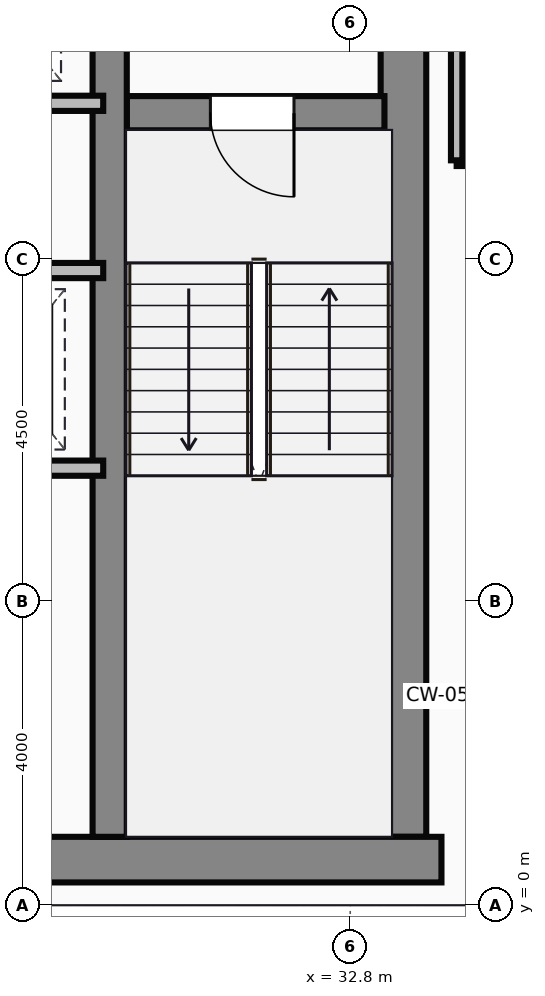
"""IFC4 building model, lengths in metres.
Left out: names, types, materials, properties, quantities, classifications, styles, units other than length and angle.
Written with IfcOpenShell. Run it as: python <this file> out.ifc"""

import sys

from ifc_helpers import new_model, si_unit, direction, frame, frame_2d, origin, place, context, subcontext, project, spatial, rectangle, extrude, source, transform, mapped, element, fill, save


model = new_model("IFC4")
c1 = context("Model", 3, precision=1e-05, world=origin(), true_north=direction((0.0, 1.0)))
c2 = subcontext(c1, "Body", "Model", "MODEL_VIEW")
j1 = project(units=[si_unit("LENGTHUNIT", "METRE"), si_unit("PLANEANGLEUNIT", "RADIAN")], contexts=[c1])
p1 = place(None, origin())
s1 = spatial("IfcSite", under=j1, at=p1, CompositionType="ELEMENT")
p2 = place(p1, origin())
s2 = spatial("IfcBuilding", under=s1, at=p2, CompositionType="ELEMENT")
p3 = place(p2, frame((0.0, 0.0, 269.75)))
s3 = spatial("IfcBuildingStorey", under=s2, at=p3, CompositionType="ELEMENT", Elevation=269.75)
m1 = source(origin(), c2, "Body", "SweptSolid", [
    extrude(rectangle(XDim=29.5, YDim=0.6, at=frame_2d((14.75, 0.0))), origin(), (0.0, 0.0, 1.0), 3.65),
])
p4 = place(p3, frame((4.5, 0.6, 0.0), z_axis=(0.0, 0.0, 1.0), x_axis=(1.0, 0.0, 0.0)))
e1 = element("IfcWall", 1, at=p4, inside=s3, PredefinedType="SHEAR", context=c2, shape_type="MappedRepresentation", body=[
    mapped(m1, transform((0.0, 0.0, 0.0))),
])
m2 = source(origin(), c2, "Body", "SweptSolid", [
    extrude(rectangle(XDim=13.1, YDim=0.6, at=frame_2d((6.55, 0.0))), origin(), (0.0, 0.0, 1.0), 3.65),
])
p5 = place(p3, frame((33.5, 0.9, 0.0), z_axis=(0.0, 0.0, 1.0), x_axis=(0.0, 1.0, 0.0)))
e2 = element("IfcWall", 2, at=p5, inside=s3, PredefinedType="SHEAR", context=c2, shape_type="MappedRepresentation", body=[
    mapped(m2, transform((0.0, 0.0, 0.0))),
])
m3 = source(origin(), c2, "Body", "SweptSolid", [
    extrude(rectangle(XDim=12.5, YDim=0.45, at=frame_2d((6.25, 0.0))), origin(), (0.0, 0.0, 1.0), 3.65),
])
p6 = place(p3, frame((29.635, 0.9, 0.0), z_axis=(0.0, 0.0, 1.0), x_axis=(0.0, 1.0, 0.0)))
e3 = element("IfcWall", 3, at=p6, inside=s3, PredefinedType="SHEAR", context=c2, shape_type="MappedRepresentation", body=[
    mapped(m3, transform((0.0, 0.0, 0.0))),
])
m4 = source(origin(), c2, "Body", "SweptSolid", [
    extrude(rectangle(XDim=3.39, YDim=0.45, at=frame_2d((1.695, 0.0))), origin(), (0.0, 0.0, 1.0), 3.65),
])
p7 = place(p3, frame((29.86, 10.42, 0.0), z_axis=(0.0, 0.0, 1.0), x_axis=(1.0, 0.0, 0.0)))
e4 = element("IfcWall", 4, at=p7, inside=s3, PredefinedType="SHEAR", context=c2, shape_type="MappedRepresentation", body=[
    mapped(m4, transform((0.0, 0.0, 0.0))),
])
p8 = place(p7, frame((1.1, 0.0, 0.0)))
e5 = element("IfcOpeningElement", 5, at=p8, cuts=e4, PredefinedType="OPENING", context=c2, shape_type="SweptSolid", body=[
    extrude(rectangle(XDim=1.1, YDim=2.15, at=frame_2d((0.55, 1.075))), frame((0.0, 0.235, 0.0), z_axis=(0.0, -1.0, 0.0), x_axis=(1.0, 0.0, 0.0)), (0.0, 0.0, 1.0), 0.47),
])
m5 = source(origin(), c2, "Body", "SweptSolid", [
    extrude(rectangle(XDim=8.8, YDim=0.2, at=frame_2d((4.4, 0.0))), origin(), (0.0, 0.0, 1.0), 3.4),
])
p9 = place(p3, frame((20.75, 10.55, 0.0), z_axis=(0.0, 0.0, 1.0), x_axis=(1.0, 0.0, 0.0)))
e6 = element("IfcWall", 6, at=p9, inside=s3, PredefinedType="PARTITIONING", context=c2, shape_type="MappedRepresentation", body=[
    mapped(m5, transform((0.0, 0.0, 0.0))),
])
p10 = place(p9, frame((0.5, 0.0, 0.0)))
e7 = element("IfcOpeningElement", 7, at=p10, cuts=e6, PredefinedType="OPENING", context=c2, shape_type="SweptSolid", body=[
    extrude(rectangle(XDim=1.05, YDim=2.15, at=frame_2d((0.525, 1.075))), frame((0.0, 0.11, 0.0), z_axis=(0.0, -1.0, 0.0), x_axis=(1.0, 0.0, 0.0)), (0.0, 0.0, 1.0), 0.22),
])
p11 = place(p9, frame((2.6, 0.0, 0.0)))
e8 = element("IfcOpeningElement", 8, at=p11, cuts=e6, PredefinedType="OPENING", context=c2, shape_type="SweptSolid", body=[
    extrude(rectangle(XDim=1.05, YDim=2.15, at=frame_2d((0.525, 1.075))), frame((0.0, 0.11, 0.0), z_axis=(0.0, -1.0, 0.0), x_axis=(1.0, 0.0, 0.0)), (0.0, 0.0, 1.0), 0.22),
])
p12 = place(p9, frame((4.7, 0.0, 0.0)))
e9 = element("IfcOpeningElement", 9, at=p12, cuts=e6, PredefinedType="OPENING", context=c2, shape_type="SweptSolid", body=[
    extrude(rectangle(XDim=1.05, YDim=2.15, at=frame_2d((0.525, 1.075))), frame((0.0, 0.11, 0.0), z_axis=(0.0, -1.0, 0.0), x_axis=(1.0, 0.0, 0.0)), (0.0, 0.0, 1.0), 0.22),
])
p13 = place(p9, frame((6.8, 0.0, 0.0)))
e10 = element("IfcOpeningElement", 10, at=p13, cuts=e6, PredefinedType="OPENING", context=c2, shape_type="SweptSolid", body=[
    extrude(rectangle(XDim=1.05, YDim=2.15, at=frame_2d((0.525, 1.075))), frame((0.0, 0.11, 0.0), z_axis=(0.0, -1.0, 0.0), x_axis=(1.0, 0.0, 0.0)), (0.0, 0.0, 1.0), 0.22),
])
m6 = source(origin(), c2, "Body", "SweptSolid", [
    extrude(rectangle(XDim=4.55, YDim=0.2, at=frame_2d((2.275, 0.0))), origin(), (0.0, 0.0, 1.0), 3.4),
])
p14 = place(p3, frame((25.0, 8.35, 0.0), z_axis=(0.0, 0.0, 1.0), x_axis=(1.0, 0.0, 0.0)))
e11 = element("IfcWall", 11, at=p14, inside=s3, PredefinedType="PARTITIONING", context=c2, shape_type="MappedRepresentation", body=[
    mapped(m6, transform((0.0, 0.0, 0.0))),
])
p15 = place(p14, frame((0.5, 0.0, 0.0)))
e12 = element("IfcOpeningElement", 12, at=p15, cuts=e11, PredefinedType="OPENING", context=c2, shape_type="SweptSolid", body=[
    extrude(rectangle(XDim=1.05, YDim=2.15, at=frame_2d((0.525, 1.075))), frame((0.0, 0.11, 0.0), z_axis=(0.0, -1.0, 0.0), x_axis=(1.0, 0.0, 0.0)), (0.0, 0.0, 1.0), 0.22),
])
p16 = place(p14, frame((2.6, 0.0, 0.0)))
e13 = element("IfcOpeningElement", 13, at=p16, cuts=e11, PredefinedType="OPENING", context=c2, shape_type="SweptSolid", body=[
    extrude(rectangle(XDim=1.05, YDim=2.15, at=frame_2d((0.525, 1.075))), frame((0.0, 0.11, 0.0), z_axis=(0.0, -1.0, 0.0), x_axis=(1.0, 0.0, 0.0)), (0.0, 0.0, 1.0), 0.22),
])
p17 = place(p3, frame((25.0, 5.75, 0.0), z_axis=(0.0, 0.0, 1.0), x_axis=(1.0, 0.0, 0.0)))
e14 = element("IfcWall", 14, at=p17, inside=s3, PredefinedType="PARTITIONING", context=c2, shape_type="MappedRepresentation", body=[
    mapped(m6, transform((0.0, 0.0, 0.0))),
])
m7 = source(origin(), c2, "Body", "SweptSolid", [
    extrude(rectangle(XDim=4.8, YDim=0.15, at=frame_2d((2.4, 0.0))), origin(), (0.0, 0.0, 1.0), 3.4),
])
p18 = place(p3, frame((34.2, 9.8, 0.0), z_axis=(0.0, 0.0, 1.0), x_axis=(1.0, 0.0, 0.0)))
e15 = element("IfcWall", 15, at=p18, inside=s3, PredefinedType="PARTITIONING", context=c2, shape_type="MappedRepresentation", body=[
    mapped(m7, transform((0.0, 0.0, 0.0))),
])
m8 = source(origin(), c2, "Body", "SweptSolid", [
    extrude(rectangle(XDim=4.18, YDim=0.15, at=frame_2d((2.09, 0.0))), origin(), (0.0, 0.0, 1.0), 3.4),
])
p19 = place(p3, frame((34.2, 9.8, 0.0), z_axis=(0.0, 0.0, 1.0), x_axis=(0.0, 1.0, 0.0)))
e16 = element("IfcWall", 16, at=p19, inside=s3, PredefinedType="PARTITIONING", context=c2, shape_type="MappedRepresentation", body=[
    mapped(m8, transform((0.0, 0.0, 0.0))),
])
m9 = source(origin(), c2, "Body", "SweptSolid", [
    extrude(rectangle(XDim=1.1, YDim=2.15, at=frame_2d((0.55, 1.075))), frame((0.0, 0.025, 0.0), z_axis=(0.0, -1.0, 0.0), x_axis=(1.0, 0.0, 0.0)), (0.0, 0.0, 1.0), 0.05),
])
p20 = place(p8, frame((1.1, 0.0, 0.0), z_axis=(0.0, 0.0, 1.0), x_axis=(-1.0, 0.0, 0.0)))
e17 = element("IfcDoor", 17, at=p20, inside=s3, OperationType="SINGLE_SWING_RIGHT", PredefinedType="DOOR", context=c2, shape_type="MappedRepresentation", body=[
    mapped(m9, transform((0.0, 0.0, 0.0))),
])
fill(e5, e17)
save(model, sys.argv[1])
